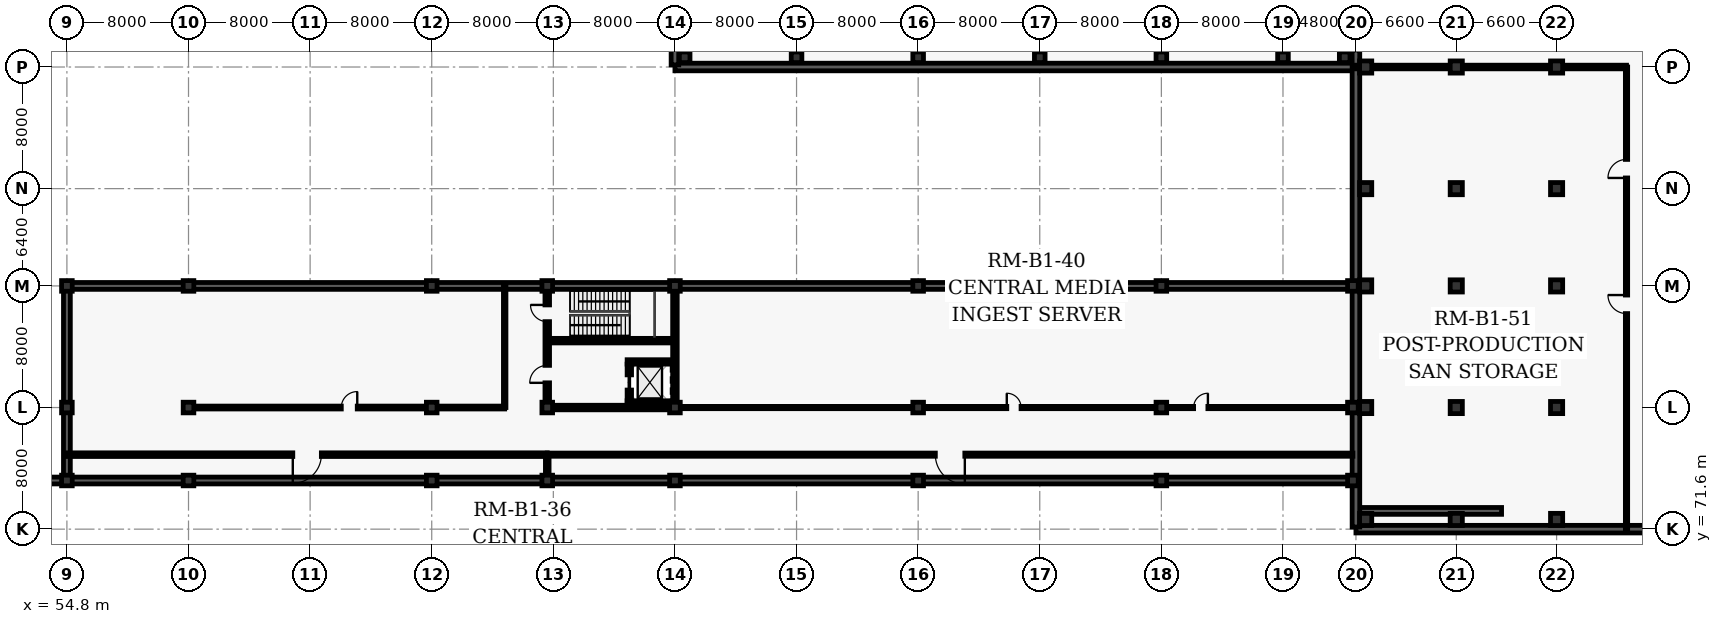
"""IFC4 building model, lengths in metres.
Left out: names, types, materials, properties, quantities, classifications, styles, units other than length and angle.
Written with IfcOpenShell. Run it as: python <this file> out.ifc"""

import sys

from ifc_helpers import new_model, si_unit, direction, frame, frame_2d, origin, origin_2d, place, context, subcontext, project, spatial, rectangle, extrude, element, fill, save


model = new_model("IFC4")
c1 = context("Model", 3, precision=1e-05, world=origin(), true_north=direction((0.0, 1.0)))
c2 = subcontext(c1, "Body", "Model", "MODEL_VIEW")
j1 = project(units=[si_unit("LENGTHUNIT", "METRE"), si_unit("PLANEANGLEUNIT", "RADIAN")], contexts=[c1])
p1 = place(None, origin())
s1 = spatial("IfcSite", under=j1, at=p1, CompositionType="ELEMENT")
p2 = place(p1, origin())
s2 = spatial("IfcBuilding", under=s1, at=p2, CompositionType="ELEMENT")
p3 = place(p2, frame((0.0, 0.0, -4.8)))
s3 = spatial("IfcBuildingStorey", under=s2, at=p3, CompositionType="ELEMENT", Elevation=-4.8)
for number, where, z_axis, x_axis in (
    (1, (95.44, 102.64, 0.0), (0.0, 0.0, 1.0), (1.0, 0.0, 0.0)),
    (2, (102.8, 102.64, 0.0), (0.0, 0.0, 1.0), (1.0, 0.0, 0.0)),
    (3, (110.8, 102.64, 0.0), (0.0, 0.0, 1.0), (1.0, 0.0, 0.0)),
    (4, (118.8, 102.64, 0.0), (0.0, 0.0, 1.0), (1.0, 0.0, 0.0)),
    (5, (126.8, 102.64, 0.0), (0.0, 0.0, 1.0), (1.0, 0.0, 0.0)),
    (6, (134.8, 102.64, 0.0), (0.0, 0.0, 1.0), (1.0, 0.0, 0.0)),
    (7, (138.86, 102.64, 0.0), (0.0, 0.0, 1.0), (1.0, 0.0, 0.0)),
    (8, (54.8, 74.8, 0.0), (0.0, 0.0, 1.0), (1.0, 0.0, 0.0)),
    (9, (54.8, 79.6, 0.0), (0.0, 0.0, 1.0), (1.0, 0.0, 0.0)),
    (10, (54.8, 87.6, 0.0), (0.0, 0.0, 1.0), (1.0, 0.0, 0.0)),
    (11, (62.8, 74.8, 0.0), (0.0, 0.0, 1.0), (1.0, 0.0, 0.0)),
    (12, (62.8, 79.6, 0.0), (0.0, 0.0, 1.0), (1.0, 0.0, 0.0)),
    (13, (62.8, 87.6, 0.0), (0.0, 0.0, 1.0), (1.0, 0.0, 0.0)),
    (14, (78.8, 74.8, 0.0), (0.0, 0.0, 1.0), (1.0, 0.0, 0.0)),
    (15, (78.8, 79.6, 0.0), (0.0, 0.0, 1.0), (1.0, 0.0, 0.0)),
    (16, (78.8, 87.6, 0.0), (0.0, 0.0, 1.0), (1.0, 0.0, 0.0)),
    (17, (86.4, 74.8, 0.0), (0.0, 0.0, 1.0), (1.0, 0.0, 0.0)),
    (18, (86.4, 79.6, 0.0), (0.0, 0.0, 1.0), (1.0, 0.0, 0.0)),
    (19, (86.4, 87.6, 0.0), (0.0, 0.0, 1.0), (1.0, 0.0, 0.0)),
    (20, (94.8, 74.8, 0.0), (0.0, 0.0, 1.0), (1.0, 0.0, 0.0)),
    (21, (94.8, 79.6, 0.0), (0.0, 0.0, 1.0), (1.0, 0.0, 0.0)),
    (22, (94.8, 87.6, 0.0), (0.0, 0.0, 1.0), (1.0, 0.0, 0.0)),
    (23, (110.8, 74.8, 0.0), (0.0, 0.0, 1.0), (1.0, 0.0, 0.0)),
    (24, (110.8, 79.6, 0.0), (0.0, 0.0, 1.0), (1.0, 0.0, 0.0)),
    (25, (110.8, 87.6, 0.0), (0.0, 0.0, 1.0), (1.0, 0.0, 0.0)),
    (26, (126.8, 74.8, 0.0), (0.0, 0.0, 1.0), (1.0, 0.0, 0.0)),
    (27, (126.8, 79.6, 0.0), (0.0, 0.0, 1.0), (1.0, 0.0, 0.0)),
    (28, (126.8, 87.6, 0.0), (0.0, 0.0, 1.0), (1.0, 0.0, 0.0)),
    (29, (139.4, 74.8, 0.0), (0.0, 0.0, 1.0), (1.0, 0.0, 0.0)),
    (30, (139.4, 79.6, 0.0), (0.0, 0.0, 1.0), (1.0, 0.0, 0.0)),
    (31, (139.4, 87.6, 0.0), (0.0, 0.0, 1.0), (1.0, 0.0, 0.0)),
):
    element("IfcColumn", number, at=place(p3, frame(where, z_axis=z_axis, x_axis=x_axis)), inside=s3, PredefinedType="COLUMN", context=c2, shape_type="SweptSolid", body=[
        extrude(rectangle(XDim=0.7, YDim=0.7, at=origin_2d()), origin(), (0.0, 0.0, 1.0), 4.8),
    ])
for number, where, z_axis, x_axis in (
    (32, (140.24, 72.24, 0.0), (0.0, 0.0, 1.0), (1.0, 0.0, 0.0)),
    (33, (140.24, 79.6, 0.0), (0.0, 0.0, 1.0), (1.0, 0.0, 0.0)),
    (34, (140.24, 87.6, 0.0), (0.0, 0.0, 1.0), (1.0, 0.0, 0.0)),
    (35, (140.24, 94.0, 0.0), (0.0, 0.0, 1.0), (1.0, 0.0, 0.0)),
    (36, (140.24, 102.0, 0.0), (0.0, 0.0, 1.0), (1.0, 0.0, 0.0)),
    (37, (146.2, 72.24, 0.0), (0.0, 0.0, 1.0), (1.0, 0.0, 0.0)),
    (38, (146.2, 79.6, 0.0), (0.0, 0.0, 1.0), (1.0, 0.0, 0.0)),
    (39, (146.2, 87.6, 0.0), (0.0, 0.0, 1.0), (1.0, 0.0, 0.0)),
    (40, (146.2, 94.0, 0.0), (0.0, 0.0, 1.0), (1.0, 0.0, 0.0)),
    (41, (146.2, 102.0, 0.0), (0.0, 0.0, 1.0), (1.0, 0.0, 0.0)),
    (42, (152.8, 72.24, 0.0), (0.0, 0.0, 1.0), (1.0, 0.0, 0.0)),
    (43, (152.8, 79.6, 0.0), (0.0, 0.0, 1.0), (1.0, 0.0, 0.0)),
    (44, (152.8, 87.6, 0.0), (0.0, 0.0, 1.0), (1.0, 0.0, 0.0)),
    (45, (152.8, 94.0, 0.0), (0.0, 0.0, 1.0), (1.0, 0.0, 0.0)),
    (46, (152.8, 102.0, 0.0), (0.0, 0.0, 1.0), (1.0, 0.0, 0.0)),
):
    element("IfcColumn", number, at=place(p3, frame(where, z_axis=z_axis, x_axis=x_axis)), inside=s3, PredefinedType="COLUMN", context=c2, shape_type="SweptSolid", body=[
        extrude(rectangle(XDim=0.8, YDim=0.8, at=origin_2d()), origin(), (0.0, 0.0, 1.0), 4.8),
    ])
p4 = place(p3, frame((46.02, 74.8, 0.0), z_axis=(0.0, 0.0, 1.0), x_axis=(1.0, 0.0, 0.0)))
e47 = element("IfcWall", 47, at=p4, inside=s3, PredefinedType="USERDEFINED", context=c2, shape_type="SweptSolid", body=[
    extrude(rectangle(XDim=8.76, YDim=0.45, at=frame_2d((4.38, 0.0))), origin(), (0.0, 0.0, 1.0), 4.53),
])
p5 = place(p3, frame((139.62, 72.8, 0.0), z_axis=(0.0, 0.0, 1.0), x_axis=(1.0, 0.0, 0.0)))
e48 = element("IfcWall", 48, at=p5, inside=s3, PredefinedType="USERDEFINED", context=c2, shape_type="SweptSolid", body=[
    extrude(rectangle(XDim=9.56, YDim=0.45, at=frame_2d((4.78, 0.0))), origin(), (0.0, 0.0, 1.0), 4.53),
])
p6 = place(p3, frame((139.5, 102.0, 0.0), z_axis=(0.0, 0.0, 1.0), x_axis=(-1.0, 0.0, 0.0)))
e49 = element("IfcWall", 49, at=p6, inside=s3, PredefinedType="USERDEFINED", context=c2, shape_type="SweptSolid", body=[
    extrude(rectangle(XDim=44.7, YDim=0.5, at=frame_2d((22.35, 0.0))), origin(), (0.0, 0.0, 1.0), 4.45),
])
p7 = place(p3, frame((94.8, 102.14, 0.0), z_axis=(0.0, 0.0, 1.0), x_axis=(0.0, 1.0, 0.0)))
e50 = element("IfcWall", 50, at=p7, inside=s3, PredefinedType="USERDEFINED", context=c2, shape_type="SweptSolid", body=[
    extrude(rectangle(XDim=15.72, YDim=0.5, at=frame_2d((7.86, 0.0))), origin(), (0.0, 0.0, 1.0), 4.45),
])
for number, where, z_axis, x_axis in (
    (51, (54.8, 87.6, 0.0), (0.0, 0.0, 1.0), (1.0, 0.0, 0.0)),
    (52, (139.4, 74.8, 0.0), (0.0, 0.0, 1.0), (-1.0, 0.0, 0.0)),
):
    element("IfcWall", number, at=place(p3, frame(where, z_axis=z_axis, x_axis=x_axis)), inside=s3, PredefinedType="USERDEFINED", context=c2, shape_type="SweptSolid", body=[
        extrude(rectangle(XDim=84.6, YDim=0.45, at=frame_2d((42.3, 0.0))), origin(), (0.0, 0.0, 1.0), 3.67),
    ])
p8 = place(p3, frame((54.8, 74.94, 0.0), z_axis=(0.0, 0.0, 1.0), x_axis=(0.0, 1.0, 0.0)))
e53 = element("IfcWall", 53, at=p8, inside=s3, PredefinedType="USERDEFINED", context=c2, shape_type="SweptSolid", body=[
    extrude(rectangle(XDim=12.52, YDim=0.45, at=frame_2d((6.26, 0.0))), origin(), (0.0, 0.0, 1.0), 3.67),
])
p9 = place(p3, frame((172.0, 71.6, 0.0), z_axis=(0.0, 0.0, 1.0), x_axis=(-1.0, 0.0, 0.0)))
e54 = element("IfcWall", 54, at=p9, inside=s3, PredefinedType="USERDEFINED", context=c2, shape_type="SweptSolid", body=[
    extrude(rectangle(XDim=32.4, YDim=0.5, at=frame_2d((16.2, 0.0))), origin(), (0.0, 0.0, 1.0), 4.5),
])
p10 = place(p3, frame((139.6, 71.74, 0.0), z_axis=(0.0, 0.0, 1.0), x_axis=(0.0, 1.0, 0.0)))
e55 = element("IfcWall", 55, at=p10, inside=s3, PredefinedType="USERDEFINED", context=c2, shape_type="SweptSolid", body=[
    extrude(rectangle(XDim=46.12, YDim=0.5, at=frame_2d((23.06, 0.0))), origin(), (0.0, 0.0, 1.0), 3.67),
])
p11 = place(p10, frame((31.38, 0.0, 0.0)))
e56 = element("IfcOpeningElement", 56, at=p11, cuts=e55, PredefinedType="OPENING", context=c2, shape_type="SweptSolid", body=[
    extrude(rectangle(XDim=1.4, YDim=2.25, at=frame_2d((0.7, 1.125))), frame((0.0, 0.26, 0.0), z_axis=(0.0, -1.0, 0.0), x_axis=(1.0, 0.0, 0.0)), (0.0, 0.0, 1.0), 0.52),
])
p12 = place(p3, frame((86.752, 79.6, 0.0), z_axis=(0.0, 0.0, 1.0), x_axis=(1.0, 0.0, 0.0)))
e57 = element("IfcWall", 57, at=p12, inside=s3, PredefinedType="SHEAR", context=c2, shape_type="SweptSolid", body=[
    extrude(rectangle(XDim=7.696, YDim=0.3, at=frame_2d((3.848, 0.0))), origin(), (0.0, 0.0, 1.0), 4.52),
])
p13 = place(p3, frame((86.4, 79.952, 0.0), z_axis=(0.0, 0.0, 1.0), x_axis=(0.0, 1.0, 0.0)))
e58 = element("IfcWall", 58, at=p13, inside=s3, PredefinedType="SHEAR", context=c2, shape_type="SweptSolid", body=[
    extrude(rectangle(XDim=7.296, YDim=0.3, at=frame_2d((3.648, 0.0))), origin(), (0.0, 0.0, 1.0), 4.52),
])
p14 = place(p13, frame((5.298, 0.0, 0.0)))
e59 = element("IfcOpeningElement", 59, at=p14, cuts=e58, PredefinedType="OPENING", context=c2, shape_type="SweptSolid", body=[
    extrude(rectangle(XDim=1.1, YDim=2.15, at=frame_2d((0.55, 1.075))), frame((0.0, 0.16, 0.0), z_axis=(0.0, -1.0, 0.0), x_axis=(1.0, 0.0, 0.0)), (0.0, 0.0, 1.0), 0.32),
])
p15 = place(p13, frame((1.273, 0.0, 0.0)))
e60 = element("IfcOpeningElement", 60, at=p15, cuts=e58, PredefinedType="OPENING", context=c2, shape_type="SweptSolid", body=[
    extrude(rectangle(XDim=1.15, YDim=2.2, at=frame_2d((0.575, 1.1))), frame((0.0, 0.16, 0.0), z_axis=(0.0, -1.0, 0.0), x_axis=(1.0, 0.0, 0.0)), (0.0, 0.0, 1.0), 0.32),
])
p16 = place(p3, frame((94.8, 79.952, 0.0), z_axis=(0.0, 0.0, 1.0), x_axis=(0.0, 1.0, 0.0)))
e61 = element("IfcWall", 61, at=p16, inside=s3, PredefinedType="SHEAR", context=c2, shape_type="SweptSolid", body=[
    extrude(rectangle(XDim=7.296, YDim=0.3, at=frame_2d((3.648, 0.0))), origin(), (0.0, 0.0, 1.0), 4.52),
])
p17 = place(p3, frame((86.55, 84.0, 0.0), z_axis=(0.0, 0.0, 1.0), x_axis=(1.0, 0.0, 0.0)))
e62 = element("IfcWall", 62, at=p17, inside=s3, PredefinedType="SHEAR", context=c2, shape_type="SweptSolid", body=[
    extrude(rectangle(XDim=8.1, YDim=0.3, at=frame_2d((4.05, 0.0))), origin(), (0.0, 0.0, 1.0), 4.52),
])
p18 = place(p3, frame((91.655, 79.9, 0.0), z_axis=(0.0, 0.0, 1.0), x_axis=(1.0, 0.0, 0.0)))
e63 = element("IfcWall", 63, at=p18, inside=s3, PredefinedType="SHEAR", context=c2, shape_type="SweptSolid", body=[
    extrude(rectangle(XDim=2.793, YDim=0.29, at=frame_2d((1.396, 0.0))), origin(), (0.0, 0.0, 1.0), 4.52),
])
p19 = place(p3, frame((91.655, 82.6, 0.0), z_axis=(0.0, 0.0, 1.0), x_axis=(1.0, 0.0, 0.0)))
e64 = element("IfcWall", 64, at=p19, inside=s3, PredefinedType="SHEAR", context=c2, shape_type="SweptSolid", body=[
    extrude(rectangle(XDim=2.99, YDim=0.29, at=frame_2d((1.495, 0.0))), origin(), (0.0, 0.0, 1.0), 4.52),
])
p20 = place(p3, frame((91.8, 80.045, 0.0), z_axis=(0.0, 0.0, 1.0), x_axis=(0.0, 1.0, 0.0)))
e65 = element("IfcWall", 65, at=p20, inside=s3, PredefinedType="SHEAR", context=c2, shape_type="SweptSolid", body=[
    extrude(rectangle(XDim=2.41, YDim=0.29, at=frame_2d((1.205, 0.0))), origin(), (0.0, 0.0, 1.0), 4.52),
])
p21 = place(p20, frame((0.705, 0.0, 0.0)))
e66 = element("IfcOpeningElement", 66, at=p21, cuts=e65, PredefinedType="OPENING", context=c2, shape_type="SweptSolid", body=[
    extrude(rectangle(XDim=1.0, YDim=2.15, at=frame_2d((0.5, 1.075))), frame((0.0, 0.155, 0.0), z_axis=(0.0, -1.0, 0.0), x_axis=(1.0, 0.0, 0.0)), (0.0, 0.0, 1.0), 0.31),
])
p22 = place(p3, frame((86.4, 76.5, 0.0), z_axis=(0.0, 0.0, 1.0), x_axis=(-1.0, 0.0, 0.0)))
e67 = element("IfcWall", 67, at=p22, inside=s3, PredefinedType="PARTITIONING", context=c2, shape_type="SweptSolid", body=[
    extrude(rectangle(XDim=31.6, YDim=0.24, at=frame_2d((15.8, 0.0))), origin(), (0.0, 0.0, 1.0), 4.52),
])
p23 = place(p22, frame((14.86, 0.0, 0.0)))
e68 = element("IfcOpeningElement", 68, at=p23, cuts=e67, PredefinedType="OPENING", context=c2, shape_type="SweptSolid", body=[
    extrude(rectangle(XDim=1.88, YDim=2.4, at=frame_2d((0.94, 1.2))), frame((0.0, 0.13, 0.0), z_axis=(0.0, -1.0, 0.0), x_axis=(1.0, 0.0, 0.0)), (0.0, 0.0, 1.0), 0.26),
])
p24 = place(p3, frame((139.4, 76.5, 0.0), z_axis=(0.0, 0.0, 1.0), x_axis=(-1.0, 0.0, 0.0)))
e69 = element("IfcWall", 69, at=p24, inside=s3, PredefinedType="PARTITIONING", context=c2, shape_type="SweptSolid", body=[
    extrude(rectangle(XDim=53.0, YDim=0.21, at=frame_2d((26.5, 0.0))), origin(), (0.0, 0.0, 1.0), 4.52),
])
p25 = place(p24, frame((25.53, 0.0, 0.0)))
e70 = element("IfcOpeningElement", 70, at=p25, cuts=e69, PredefinedType="OPENING", context=c2, shape_type="SweptSolid", body=[
    extrude(rectangle(XDim=1.94, YDim=2.4, at=frame_2d((0.97, 1.2))), frame((0.0, 0.115, 0.0), z_axis=(0.0, -1.0, 0.0), x_axis=(1.0, 0.0, 0.0)), (0.0, 0.0, 1.0), 0.23),
])
p26 = place(p3, frame((63.152, 79.6, 0.0), z_axis=(0.0, 0.0, 1.0), x_axis=(1.0, 0.0, 0.0)))
e71 = element("IfcWall", 71, at=p26, inside=s3, PredefinedType="PARTITIONING", context=c2, shape_type="SweptSolid", body=[
    extrude(rectangle(XDim=20.448, YDim=0.19, at=frame_2d((10.224, 0.0))), origin(), (0.0, 0.0, 1.0), 3.67),
])
p27 = place(p26, frame((9.699, 0.0, 0.0)))
e72 = element("IfcOpeningElement", 72, at=p27, cuts=e71, PredefinedType="OPENING", context=c2, shape_type="SweptSolid", body=[
    extrude(rectangle(XDim=1.05, YDim=2.15, at=frame_2d((0.525, 1.075))), frame((0.0, 0.105, 0.0), z_axis=(0.0, -1.0, 0.0), x_axis=(1.0, 0.0, 0.0)), (0.0, 0.0, 1.0), 0.21),
])
p28 = place(p3, frame((83.6, 79.6, 0.0), z_axis=(0.0, 0.0, 1.0), x_axis=(0.0, 1.0, 0.0)))
e73 = element("IfcWall", 73, at=p28, inside=s3, PredefinedType="PARTITIONING", context=c2, shape_type="SweptSolid", body=[
    extrude(rectangle(XDim=8.0, YDim=0.165, at=frame_2d((4.0, 0.0))), origin(), (0.0, 0.0, 1.0), 4.52),
])
p29 = place(p3, frame((95.152, 79.6, 0.0), z_axis=(0.0, 0.0, 1.0), x_axis=(1.0, 0.0, 0.0)))
e74 = element("IfcWall", 74, at=p29, inside=s3, PredefinedType="PARTITIONING", context=c2, shape_type="SweptSolid", body=[
    extrude(rectangle(XDim=43.896, YDim=0.15, at=frame_2d((21.948, 0.0))), origin(), (0.0, 0.0, 1.0), 3.67),
])
p30 = place(p29, frame((21.478, 0.0, 0.0)))
e75 = element("IfcOpeningElement", 75, at=p30, cuts=e74, PredefinedType="OPENING", context=c2, shape_type="SweptSolid", body=[
    extrude(rectangle(XDim=0.94, YDim=2.15, at=frame_2d((0.47, 1.075))), frame((0.0, 0.085, 0.0), z_axis=(0.0, -1.0, 0.0), x_axis=(1.0, 0.0, 0.0)), (0.0, 0.0, 1.0), 0.17),
])
p31 = place(p29, frame((33.769, 0.0, 0.0)))
e76 = element("IfcOpeningElement", 76, at=p31, cuts=e74, PredefinedType="OPENING", context=c2, shape_type="SweptSolid", body=[
    extrude(rectangle(XDim=0.94, YDim=2.15, at=frame_2d((0.47, 1.075))), frame((0.0, 0.085, 0.0), z_axis=(0.0, -1.0, 0.0), x_axis=(1.0, 0.0, 0.0)), (0.0, 0.0, 1.0), 0.17),
])
p32 = place(p3, frame((86.4, 76.5, 0.0), z_axis=(0.0, 0.0, 1.0), x_axis=(0.0, -1.0, 0.0)))
e77 = element("IfcWall", 77, at=p32, inside=s3, PredefinedType="PARTITIONING", context=c2, shape_type="SweptSolid", body=[
    extrude(rectangle(XDim=1.348, YDim=0.24, at=frame_2d((0.674, 0.0))), origin(), (0.0, 0.0, 1.0), 3.77),
])
p33 = place(p3, frame((157.4, 102.0, 0.0), z_axis=(0.0, 0.0, 1.0), x_axis=(-1.0, 0.0, 0.0)))
e78 = element("IfcWall", 78, at=p33, inside=s3, PredefinedType="PARTITIONING", context=c2, shape_type="SweptSolid", body=[
    extrude(rectangle(XDim=17.8, YDim=0.24, at=frame_2d((8.9, 0.0))), origin(), (0.0, 0.0, 1.0), 3.85),
])
p34 = place(p3, frame((157.4, 71.6, 0.0), z_axis=(0.0, 0.0, 1.0), x_axis=(0.0, 1.0, 0.0)))
e79 = element("IfcWall", 79, at=p34, inside=s3, PredefinedType="PARTITIONING", context=c2, shape_type="SweptSolid", body=[
    extrude(rectangle(XDim=30.4, YDim=0.15, at=frame_2d((15.2, 0.0))), origin(), (0.0, 0.0, 1.0), 4.5),
])
p35 = place(p34, frame((14.18, 0.0, 0.0)))
e80 = element("IfcOpeningElement", 80, at=p35, cuts=e79, PredefinedType="OPENING", context=c2, shape_type="SweptSolid", body=[
    extrude(rectangle(XDim=1.22, YDim=2.2, at=frame_2d((0.61, 1.1))), frame((0.0, 0.085, 0.0), z_axis=(0.0, -1.0, 0.0), x_axis=(1.0, 0.0, 0.0)), (0.0, 0.0, 1.0), 0.17),
])
p36 = place(p34, frame((23.102, 0.0, 0.0)))
e81 = element("IfcOpeningElement", 81, at=p36, cuts=e79, PredefinedType="OPENING", context=c2, shape_type="SweptSolid", body=[
    extrude(rectangle(XDim=1.22, YDim=2.2, at=frame_2d((0.61, 1.1))), frame((0.0, 0.085, 0.0), z_axis=(0.0, -1.0, 0.0), x_axis=(1.0, 0.0, 0.0)), (0.0, 0.0, 1.0), 0.17),
])
p37 = place(p14, origin())
e82 = element("IfcDoor", 82, at=p37, inside=s3, OperationType="SINGLE_SWING_RIGHT", PredefinedType="DOOR", context=c2, shape_type="SweptSolid", body=[
    extrude(rectangle(XDim=1.1, YDim=2.15, at=frame_2d((0.55, 1.075))), frame((0.0, 0.025, 0.0), z_axis=(0.0, -1.0, 0.0), x_axis=(1.0, 0.0, 0.0)), (0.0, 0.0, 1.0), 0.05),
])
fill(e59, e82)
p38 = place(p15, origin())
e83 = element("IfcDoor", 83, at=p38, inside=s3, OperationType="SINGLE_SWING_LEFT", PredefinedType="DOOR", context=c2, shape_type="SweptSolid", body=[
    extrude(rectangle(XDim=1.15, YDim=2.2, at=frame_2d((0.575, 1.1))), frame((0.0, 0.025, 0.0), z_axis=(0.0, -1.0, 0.0), x_axis=(1.0, 0.0, 0.0)), (0.0, 0.0, 1.0), 0.05),
])
fill(e60, e83)
p39 = place(p21, origin())
e84 = element("IfcDoor", 84, at=p39, inside=s3, OperationType="SLIDING_TO_LEFT", PredefinedType="DOOR", context=c2, shape_type="SweptSolid", body=[
    extrude(rectangle(XDim=1.0, YDim=2.15, at=frame_2d((0.5, 1.075))), frame((0.0, 0.025, 0.0), z_axis=(0.0, -1.0, 0.0), x_axis=(1.0, 0.0, 0.0)), (0.0, 0.0, 1.0), 0.05),
])
fill(e66, e84)
p40 = place(p23, origin())
e85 = element("IfcDoor", 85, at=p40, inside=s3, OperationType="SINGLE_SWING_RIGHT", PredefinedType="DOOR", context=c2, shape_type="SweptSolid", body=[
    extrude(rectangle(XDim=1.88, YDim=2.4, at=frame_2d((0.94, 1.2))), frame((0.0, 0.025, 0.0), z_axis=(0.0, -1.0, 0.0), x_axis=(1.0, 0.0, 0.0)), (0.0, 0.0, 1.0), 0.05),
])
fill(e68, e85)
p41 = place(p25, origin())
e86 = element("IfcDoor", 86, at=p41, inside=s3, OperationType="SINGLE_SWING_LEFT", PredefinedType="DOOR", context=c2, shape_type="SweptSolid", body=[
    extrude(rectangle(XDim=1.94, YDim=2.4, at=frame_2d((0.97, 1.2))), frame((0.0, 0.025, 0.0), z_axis=(0.0, -1.0, 0.0), x_axis=(1.0, 0.0, 0.0)), (0.0, 0.0, 1.0), 0.05),
])
fill(e70, e86)
p42 = place(p27, origin())
e87 = element("IfcDoor", 87, at=p42, inside=s3, OperationType="SINGLE_SWING_RIGHT", PredefinedType="DOOR", context=c2, shape_type="SweptSolid", body=[
    extrude(rectangle(XDim=1.05, YDim=2.15, at=frame_2d((0.525, 1.075))), frame((0.0, 0.025, 0.0), z_axis=(0.0, -1.0, 0.0), x_axis=(1.0, 0.0, 0.0)), (0.0, 0.0, 1.0), 0.05),
])
fill(e72, e87)
p43 = place(p30, origin())
e88 = element("IfcDoor", 88, at=p43, inside=s3, OperationType="SINGLE_SWING_LEFT", PredefinedType="DOOR", context=c2, shape_type="SweptSolid", body=[
    extrude(rectangle(XDim=0.94, YDim=2.15, at=frame_2d((0.47, 1.075))), frame((0.0, 0.025, 0.0), z_axis=(0.0, -1.0, 0.0), x_axis=(1.0, 0.0, 0.0)), (0.0, 0.0, 1.0), 0.05),
])
fill(e75, e88)
p44 = place(p31, origin())
e89 = element("IfcDoor", 89, at=p44, inside=s3, OperationType="SINGLE_SWING_RIGHT", PredefinedType="DOOR", context=c2, shape_type="SweptSolid", body=[
    extrude(rectangle(XDim=0.94, YDim=2.15, at=frame_2d((0.47, 1.075))), frame((0.0, 0.025, 0.0), z_axis=(0.0, -1.0, 0.0), x_axis=(1.0, 0.0, 0.0)), (0.0, 0.0, 1.0), 0.05),
])
fill(e76, e89)
p45 = place(p35, origin())
e90 = element("IfcDoor", 90, at=p45, inside=s3, OperationType="SINGLE_SWING_RIGHT", PredefinedType="DOOR", context=c2, shape_type="SweptSolid", body=[
    extrude(rectangle(XDim=1.22, YDim=2.2, at=frame_2d((0.61, 1.1))), frame((0.0, 0.025, 0.0), z_axis=(0.0, -1.0, 0.0), x_axis=(1.0, 0.0, 0.0)), (0.0, 0.0, 1.0), 0.05),
])
fill(e80, e90)
p46 = place(p36, origin())
e91 = element("IfcDoor", 91, at=p46, inside=s3, OperationType="SINGLE_SWING_LEFT", PredefinedType="DOOR", context=c2, shape_type="SweptSolid", body=[
    extrude(rectangle(XDim=1.22, YDim=2.2, at=frame_2d((0.61, 1.1))), frame((0.0, 0.025, 0.0), z_axis=(0.0, -1.0, 0.0), x_axis=(1.0, 0.0, 0.0)), (0.0, 0.0, 1.0), 0.05),
])
fill(e81, e91)
save(model, sys.argv[1])
